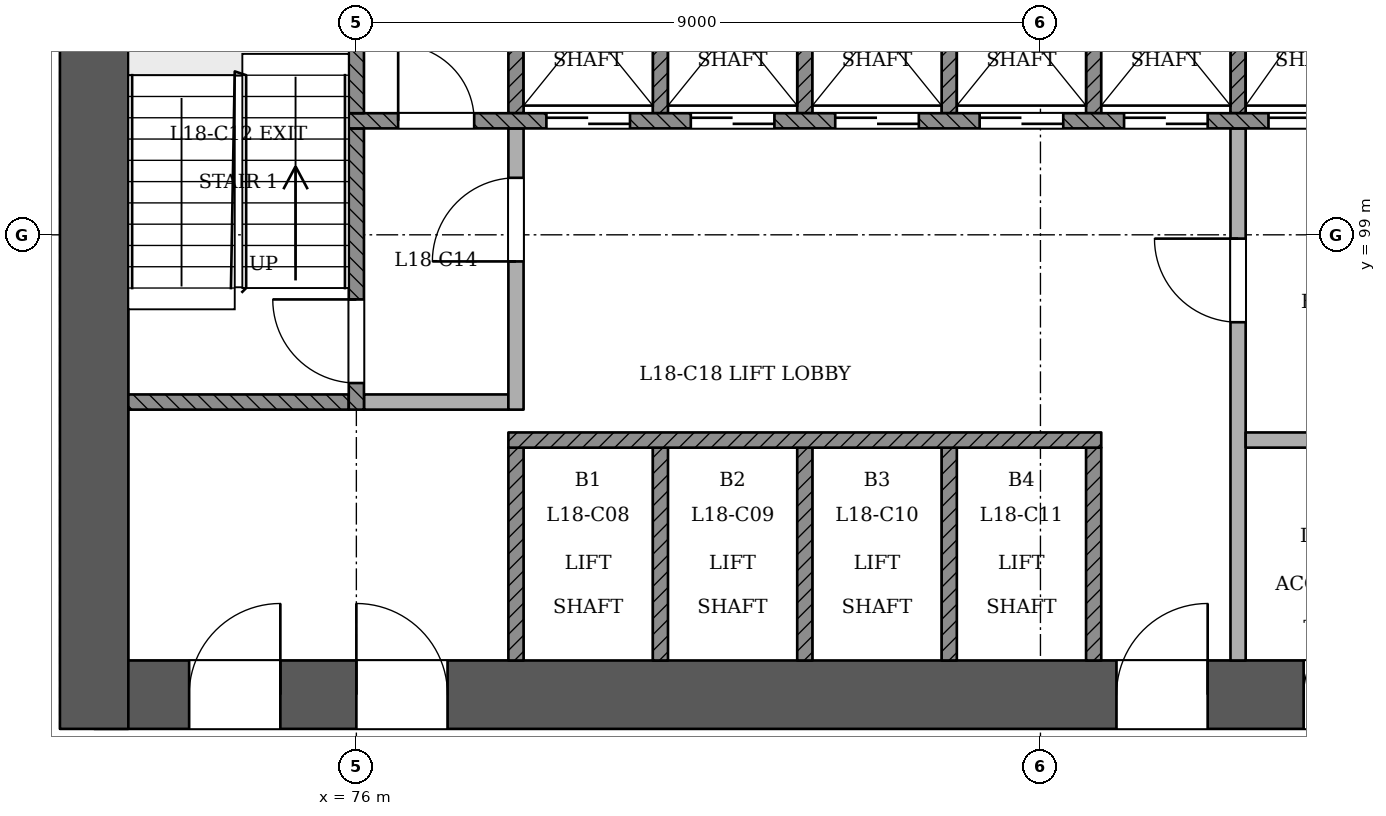
"""IFC4 building model, lengths in metres.
Left out: names, types, materials, properties, quantities, classifications, styles, units other than length and angle.
Written with IfcOpenShell. Run it as: python <this file> out.ifc"""

import sys

from ifc_helpers import new_model, si_unit, direction, frame, frame_2d, origin, place, context, subcontext, project, spatial, rectangle, extrude, element, fill, save


model = new_model("IFC4")
c1 = context("Model", 3, precision=1e-05, world=origin(), true_north=direction((0.0, 1.0)))
c2 = subcontext(c1, "Body", "Model", "MODEL_VIEW")
j1 = project(units=[si_unit("LENGTHUNIT", "METRE"), si_unit("PLANEANGLEUNIT", "RADIAN")], contexts=[c1])
p1 = place(None, origin())
s1 = spatial("IfcSite", under=j1, at=p1, CompositionType="ELEMENT")
p2 = place(p1, origin())
s2 = spatial("IfcBuilding", under=s1, at=p2, CompositionType="ELEMENT")
p3 = place(p2, frame((0.0, 0.0, 73.8)))
s3 = spatial("IfcBuildingStorey", under=s2, at=p3, CompositionType="ELEMENT", Elevation=73.8)
p4 = place(p3, frame((72.55, 92.95, 0.0), z_axis=(0.0, 0.0, 1.0), x_axis=(1.0, 0.0, 0.0)))
e1 = element("IfcWall", 1, at=p4, inside=s3, PredefinedType="SHEAR", context=c2, shape_type="SweptSolid", body=[
    extrude(rectangle(XDim=25.35, YDim=0.9, at=frame_2d((12.675, 0.0))), origin(), (0.0, 0.0, 1.0), 3.6),
])
p5 = place(p4, frame((1.25, 0.0, 0.0)))
e2 = element("IfcOpeningElement", 2, at=p5, cuts=e1, PredefinedType="OPENING", context=c2, shape_type="SweptSolid", body=[
    extrude(rectangle(XDim=1.2, YDim=2.1, at=frame_2d((0.6, 1.05))), frame((0.0, 0.46, 0.0), z_axis=(0.0, -1.0, 0.0), x_axis=(1.0, 0.0, 0.0)), (0.0, 0.0, 1.0), 0.921),
])
p6 = place(p4, frame((3.45, 0.0, 0.0)))
e3 = element("IfcOpeningElement", 3, at=p6, cuts=e1, PredefinedType="OPENING", context=c2, shape_type="SweptSolid", body=[
    extrude(rectangle(XDim=1.2, YDim=2.1, at=frame_2d((0.6, 1.05))), frame((0.0, 0.46, 0.0), z_axis=(0.0, -1.0, 0.0), x_axis=(1.0, 0.0, 0.0)), (0.0, 0.0, 1.0), 0.921),
])
p7 = place(p4, frame((13.45, 0.0, 0.0)))
e4 = element("IfcOpeningElement", 4, at=p7, cuts=e1, PredefinedType="OPENING", context=c2, shape_type="SweptSolid", body=[
    extrude(rectangle(XDim=1.2, YDim=2.1, at=frame_2d((0.6, 1.05))), frame((0.0, 0.46, 0.0), z_axis=(0.0, -1.0, 0.0), x_axis=(1.0, 0.0, 0.0)), (0.0, 0.0, 1.0), 0.921),
])
p8 = place(p4, frame((15.913, 0.0, 0.0)))
e5 = element("IfcOpeningElement", 5, at=p8, cuts=e1, PredefinedType="OPENING", context=c2, shape_type="SweptSolid", body=[
    extrude(rectangle(XDim=1.0, YDim=2.1, at=frame_2d((0.5, 1.05))), frame((0.0, 0.46, 0.0), z_axis=(0.0, -1.0, 0.0), x_axis=(1.0, 0.0, 0.0)), (0.0, 0.0, 1.0), 0.921),
])
p9 = place(p4, frame((18.35, 0.0, 0.0)))
e6 = element("IfcOpeningElement", 6, at=p9, cuts=e1, PredefinedType="OPENING", context=c2, shape_type="SweptSolid", body=[
    extrude(rectangle(XDim=1.0, YDim=2.1, at=frame_2d((0.5, 1.05))), frame((0.0, 0.46, 0.0), z_axis=(0.0, -1.0, 0.0), x_axis=(1.0, 0.0, 0.0)), (0.0, 0.0, 1.0), 0.921),
])
p10 = place(p4, frame((20.7, 0.0, 0.0)))
e7 = element("IfcOpeningElement", 7, at=p10, cuts=e1, PredefinedType="OPENING", context=c2, shape_type="SweptSolid", body=[
    extrude(rectangle(XDim=1.0, YDim=2.1, at=frame_2d((0.5, 1.05))), frame((0.0, 0.46, 0.0), z_axis=(0.0, -1.0, 0.0), x_axis=(1.0, 0.0, 0.0)), (0.0, 0.0, 1.0), 0.921),
])
p11 = place(p4, frame((22.988, 0.0, 0.0)))
e8 = element("IfcOpeningElement", 8, at=p11, cuts=e1, PredefinedType="OPENING", context=c2, shape_type="SweptSolid", body=[
    extrude(rectangle(XDim=1.0, YDim=2.1, at=frame_2d((0.5, 1.05))), frame((0.0, 0.46, 0.0), z_axis=(0.0, -1.0, 0.0), x_axis=(1.0, 0.0, 0.0)), (0.0, 0.0, 1.0), 0.921),
])
p12 = place(p3, frame((72.55, 103.85, 0.0), z_axis=(0.0, 0.0, 1.0), x_axis=(0.0, -1.0, 0.0)))
e9 = element("IfcWall", 9, at=p12, inside=s3, PredefinedType="SHEAR", context=c2, shape_type="SweptSolid", body=[
    extrude(rectangle(XDim=11.35, YDim=0.9, at=frame_2d((5.675, 0.0))), origin(), (0.0, 0.0, 1.0), 3.6),
])
p13 = place(p3, frame((85.747, 59.896, 0.0), z_axis=(0.0, 0.0, 1.0), x_axis=(0.500002549277, 0.866023931954, 0.0)))
e10 = element("IfcWall", 10, at=p13, inside=s3, PredefinedType="PARTITIONING", context=c2, shape_type="SweptSolid", body=[
    extrude(rectangle(XDim=43.082, YDim=0.15, at=frame_2d((21.541, 0.0))), origin(), (0.0, 0.0, 1.0), 2.7),
])
p14 = place(p13, frame((0.244, 0.0, 0.0)))
e11 = element("IfcOpeningElement", 11, at=p14, cuts=e10, PredefinedType="OPENING", context=c2, shape_type="SweptSolid", body=[
    extrude(rectangle(XDim=1.2, YDim=2.1, at=frame_2d((0.6, 1.05))), frame((0.0, 0.085, 0.0), z_axis=(0.0, -1.0, 0.0), x_axis=(1.0, 0.0, 0.0)), (0.0, 0.0, 1.0), 0.171),
])
p15 = place(p13, frame((4.146, 0.0, 0.0)))
e12 = element("IfcOpeningElement", 12, at=p15, cuts=e10, PredefinedType="OPENING", context=c2, shape_type="SweptSolid", body=[
    extrude(rectangle(XDim=1.0, YDim=2.1, at=frame_2d((0.5, 1.05))), frame((0.0, 0.085, 0.0), z_axis=(0.0, -1.0, 0.0), x_axis=(1.0, 0.0, 0.0)), (0.0, 0.0, 1.0), 0.171),
])
p16 = place(p13, frame((10.821, 0.0, 0.0)))
e13 = element("IfcOpeningElement", 13, at=p16, cuts=e10, PredefinedType="OPENING", context=c2, shape_type="SweptSolid", body=[
    extrude(rectangle(XDim=1.0, YDim=2.1, at=frame_2d((0.5, 1.05))), frame((0.0, 0.085, 0.0), z_axis=(0.0, -1.0, 0.0), x_axis=(1.0, 0.0, 0.0)), (0.0, 0.0, 1.0), 0.171),
])
p17 = place(p13, frame((13.262, 0.0, 0.0)))
e14 = element("IfcOpeningElement", 14, at=p17, cuts=e10, PredefinedType="OPENING", context=c2, shape_type="SweptSolid", body=[
    extrude(rectangle(XDim=1.0, YDim=2.1, at=frame_2d((0.5, 1.05))), frame((0.0, 0.085, 0.0), z_axis=(0.0, -1.0, 0.0), x_axis=(1.0, 0.0, 0.0)), (0.0, 0.0, 1.0), 0.171),
])
p18 = place(p13, frame((20.941, 0.0, 0.0)))
e15 = element("IfcOpeningElement", 15, at=p18, cuts=e10, PredefinedType="OPENING", context=c2, shape_type="SweptSolid", body=[
    extrude(rectangle(XDim=1.2, YDim=2.1, at=frame_2d((0.6, 1.05))), frame((0.0, 0.085, 0.0), z_axis=(0.0, -1.0, 0.0), x_axis=(1.0, 0.0, 0.0)), (0.0, 0.0, 1.0), 0.171),
])
p19 = place(p13, frame((28.821, 0.0, 0.0)))
e16 = element("IfcOpeningElement", 16, at=p19, cuts=e10, PredefinedType="OPENING", context=c2, shape_type="SweptSolid", body=[
    extrude(rectangle(XDim=1.0, YDim=2.1, at=frame_2d((0.5, 1.05))), frame((0.0, 0.085, 0.0), z_axis=(0.0, -1.0, 0.0), x_axis=(1.0, 0.0, 0.0)), (0.0, 0.0, 1.0), 0.171),
])
p20 = place(p13, frame((31.112, 0.0, 0.0)))
e17 = element("IfcOpeningElement", 17, at=p20, cuts=e10, PredefinedType="OPENING", context=c2, shape_type="SweptSolid", body=[
    extrude(rectangle(XDim=1.1, YDim=2.1, at=frame_2d((0.55, 1.05))), frame((0.0, 0.085, 0.0), z_axis=(0.0, -1.0, 0.0), x_axis=(1.0, 0.0, 0.0)), (0.0, 0.0, 1.0), 0.171),
])
p21 = place(p13, frame((38.514, 0.0, 0.0)))
e18 = element("IfcOpeningElement", 18, at=p21, cuts=e10, PredefinedType="OPENING", context=c2, shape_type="SweptSolid", body=[
    extrude(rectangle(XDim=1.2, YDim=2.1, at=frame_2d((0.6, 1.05))), frame((0.0, 0.085, 0.0), z_axis=(0.0, -1.0, 0.0), x_axis=(1.0, 0.0, 0.0)), (0.0, 0.0, 1.0), 0.171),
])
for number, where, z_axis, x_axis in (
    (19, (78.1, 93.4, 0.0), (0.0, 0.0, 1.0), (0.0, 1.0, 0.0)),
    (20, (80.0, 93.4, 0.0), (0.0, 0.0, 1.0), (0.0, 1.0, 0.0)),
    (21, (81.9, 93.4, 0.0), (0.0, 0.0, 1.0), (0.0, 1.0, 0.0)),
    (22, (83.8, 93.4, 0.0), (0.0, 0.0, 1.0), (0.0, 1.0, 0.0)),
    (23, (85.7, 93.4, 0.0), (0.0, 0.0, 1.0), (0.0, 1.0, 0.0)),
):
    element("IfcWall", number, at=place(p3, frame(where, z_axis=z_axis, x_axis=x_axis)), inside=s3, PredefinedType="SOLIDWALL", context=c2, shape_type="SweptSolid", body=[
        extrude(rectangle(XDim=2.8, YDim=0.2, at=frame_2d((1.4, 0.0))), origin(), (0.0, 0.0, 1.0), 3.1),
    ])
p22 = place(p3, frame((87.6, 93.4, 0.0), z_axis=(0.0, 0.0, 1.0), x_axis=(0.0, 1.0, 0.0)))
e24 = element("IfcWall", 24, at=p22, inside=s3, PredefinedType="PARTITIONING", context=c2, shape_type="SweptSolid", body=[
    extrude(rectangle(XDim=7.0, YDim=0.2, at=frame_2d((3.5, 0.0))), origin(), (0.0, 0.0, 1.0), 3.1),
])
p23 = place(p22, frame((4.45, 0.0, 0.0)))
e25 = element("IfcOpeningElement", 25, at=p23, cuts=e24, PredefinedType="OPENING", context=c2, shape_type="SweptSolid", body=[
    extrude(rectangle(XDim=1.1, YDim=2.1, at=frame_2d((0.55, 1.05))), frame((0.0, 0.11, 0.0), z_axis=(0.0, -1.0, 0.0), x_axis=(1.0, 0.0, 0.0)), (0.0, 0.0, 1.0), 0.221),
])
p24 = place(p3, frame((78.0, 96.3, 0.0), z_axis=(0.0, 0.0, 1.0), x_axis=(1.0, 0.0, 0.0)))
e26 = element("IfcWall", 26, at=p24, inside=s3, PredefinedType="SOLIDWALL", context=c2, shape_type="SweptSolid", body=[
    extrude(rectangle(XDim=7.8, YDim=0.2, at=frame_2d((3.9, 0.0))), origin(), (0.0, 0.0, 1.0), 3.1),
])
p25 = place(p3, frame((87.7, 96.3, 0.0), z_axis=(0.0, 0.0, 1.0), x_axis=(1.0, 0.0, 0.0)))
e27 = element("IfcWall", 27, at=p25, inside=s3, PredefinedType="PARTITIONING", context=c2, shape_type="SweptSolid", body=[
    extrude(rectangle(XDim=3.6, YDim=0.2, at=frame_2d((1.8, 0.0))), origin(), (0.0, 0.0, 1.0), 3.1),
])
p26 = place(p3, frame((73.0, 96.8, 0.0), z_axis=(0.0, 0.0, 1.0), x_axis=(1.0, 0.0, 0.0)))
e28 = element("IfcWall", 28, at=p26, inside=s3, PredefinedType="SOLIDWALL", context=c2, shape_type="SweptSolid", body=[
    extrude(rectangle(XDim=2.9, YDim=0.2, at=frame_2d((1.45, 0.0))), origin(), (0.0, 0.0, 1.0), 3.1),
])
p27 = place(p3, frame((76.0, 96.7, 0.0), z_axis=(0.0, 0.0, 1.0), x_axis=(0.0, 1.0, 0.0)))
e29 = element("IfcWall", 29, at=p27, inside=s3, PredefinedType="SOLIDWALL", context=c2, shape_type="SweptSolid", body=[
    extrude(rectangle(XDim=3.7, YDim=0.2, at=frame_2d((1.85, 0.0))), origin(), (0.0, 0.0, 1.0), 3.1),
])
p28 = place(p27, frame((0.35, 0.0, 0.0)))
e30 = element("IfcOpeningElement", 30, at=p28, cuts=e29, PredefinedType="OPENING", context=c2, shape_type="SweptSolid", body=[
    extrude(rectangle(XDim=1.1, YDim=2.1, at=frame_2d((0.55, 1.05))), frame((0.0, 0.11, 0.0), z_axis=(0.0, -1.0, 0.0), x_axis=(1.0, 0.0, 0.0)), (0.0, 0.0, 1.0), 0.221),
])
p29 = place(p3, frame((76.1, 96.8, 0.0), z_axis=(0.0, 0.0, 1.0), x_axis=(1.0, 0.0, 0.0)))
e31 = element("IfcWall", 31, at=p29, inside=s3, PredefinedType="PARTITIONING", context=c2, shape_type="SweptSolid", body=[
    extrude(rectangle(XDim=1.9, YDim=0.2, at=frame_2d((0.95, 0.0))), origin(), (0.0, 0.0, 1.0), 3.1),
])
p30 = place(p3, frame((78.1, 96.7, 0.0), z_axis=(0.0, 0.0, 1.0), x_axis=(0.0, 1.0, 0.0)))
e32 = element("IfcWall", 32, at=p30, inside=s3, PredefinedType="PARTITIONING", context=c2, shape_type="SweptSolid", body=[
    extrude(rectangle(XDim=3.7, YDim=0.2, at=frame_2d((1.85, 0.0))), origin(), (0.0, 0.0, 1.0), 3.1),
])
p31 = place(p30, frame((1.95, 0.0, 0.0)))
e33 = element("IfcOpeningElement", 33, at=p31, cuts=e32, PredefinedType="OPENING", context=c2, shape_type="SweptSolid", body=[
    extrude(rectangle(XDim=1.1, YDim=2.1, at=frame_2d((0.55, 1.05))), frame((0.0, 0.11, 0.0), z_axis=(0.0, -1.0, 0.0), x_axis=(1.0, 0.0, 0.0)), (0.0, 0.0, 1.0), 0.221),
])
p32 = place(p3, frame((75.9, 100.5, 0.0), z_axis=(0.0, 0.0, 1.0), x_axis=(1.0, 0.0, 0.0)))
e34 = element("IfcWall", 34, at=p32, inside=s3, PredefinedType="SOLIDWALL", context=c2, shape_type="SweptSolid", body=[
    extrude(rectangle(XDim=18.2, YDim=0.2, at=frame_2d((9.1, 0.0))), origin(), (0.0, 0.0, 1.0), 3.1),
])
p33 = place(p32, frame((2.6, 0.0, 0.0)))
e35 = element("IfcOpeningElement", 35, at=p33, cuts=e34, PredefinedType="OPENING", context=c2, shape_type="SweptSolid", body=[
    extrude(rectangle(XDim=1.1, YDim=2.1, at=frame_2d((0.55, 1.05))), frame((0.0, 0.11, 0.0), z_axis=(0.0, -1.0, 0.0), x_axis=(1.0, 0.0, 0.0)), (0.0, 0.0, 1.0), 0.221),
])
p34 = place(p32, frame((4.5, 0.0, 0.0)))
e36 = element("IfcOpeningElement", 36, at=p34, cuts=e34, PredefinedType="OPENING", context=c2, shape_type="SweptSolid", body=[
    extrude(rectangle(XDim=1.1, YDim=2.1, at=frame_2d((0.55, 1.05))), frame((0.0, 0.11, 0.0), z_axis=(0.0, -1.0, 0.0), x_axis=(1.0, 0.0, 0.0)), (0.0, 0.0, 1.0), 0.221),
])
p35 = place(p32, frame((6.4, 0.0, 0.0)))
e37 = element("IfcOpeningElement", 37, at=p35, cuts=e34, PredefinedType="OPENING", context=c2, shape_type="SweptSolid", body=[
    extrude(rectangle(XDim=1.1, YDim=2.1, at=frame_2d((0.55, 1.05))), frame((0.0, 0.11, 0.0), z_axis=(0.0, -1.0, 0.0), x_axis=(1.0, 0.0, 0.0)), (0.0, 0.0, 1.0), 0.221),
])
p36 = place(p32, frame((8.3, 0.0, 0.0)))
e38 = element("IfcOpeningElement", 38, at=p36, cuts=e34, PredefinedType="OPENING", context=c2, shape_type="SweptSolid", body=[
    extrude(rectangle(XDim=1.1, YDim=2.1, at=frame_2d((0.55, 1.05))), frame((0.0, 0.11, 0.0), z_axis=(0.0, -1.0, 0.0), x_axis=(1.0, 0.0, 0.0)), (0.0, 0.0, 1.0), 0.221),
])
p37 = place(p32, frame((10.2, 0.0, 0.0)))
e39 = element("IfcOpeningElement", 39, at=p37, cuts=e34, PredefinedType="OPENING", context=c2, shape_type="SweptSolid", body=[
    extrude(rectangle(XDim=1.1, YDim=2.1, at=frame_2d((0.55, 1.05))), frame((0.0, 0.11, 0.0), z_axis=(0.0, -1.0, 0.0), x_axis=(1.0, 0.0, 0.0)), (0.0, 0.0, 1.0), 0.221),
])
p38 = place(p32, frame((12.1, 0.0, 0.0)))
e40 = element("IfcOpeningElement", 40, at=p38, cuts=e34, PredefinedType="OPENING", context=c2, shape_type="SweptSolid", body=[
    extrude(rectangle(XDim=1.1, YDim=2.1, at=frame_2d((0.55, 1.05))), frame((0.0, 0.11, 0.0), z_axis=(0.0, -1.0, 0.0), x_axis=(1.0, 0.0, 0.0)), (0.0, 0.0, 1.0), 0.221),
])
p39 = place(p32, frame((14.0, 0.0, 0.0)))
e41 = element("IfcOpeningElement", 41, at=p39, cuts=e34, PredefinedType="OPENING", context=c2, shape_type="SweptSolid", body=[
    extrude(rectangle(XDim=1.1, YDim=2.1, at=frame_2d((0.55, 1.05))), frame((0.0, 0.11, 0.0), z_axis=(0.0, -1.0, 0.0), x_axis=(1.0, 0.0, 0.0)), (0.0, 0.0, 1.0), 0.221),
])
p40 = place(p32, frame((0.65, 0.0, 0.0)))
e42 = element("IfcOpeningElement", 42, at=p40, cuts=e34, PredefinedType="OPENING", context=c2, shape_type="SweptSolid", body=[
    extrude(rectangle(XDim=1.0, YDim=2.1, at=frame_2d((0.5, 1.05))), frame((0.0, 0.11, 0.0), z_axis=(0.0, -1.0, 0.0), x_axis=(1.0, 0.0, 0.0)), (0.0, 0.0, 1.0), 0.221),
])
p41 = place(p32, frame((16.3, 0.0, 0.0)))
e43 = element("IfcOpeningElement", 43, at=p41, cuts=e34, PredefinedType="OPENING", context=c2, shape_type="SweptSolid", body=[
    extrude(rectangle(XDim=1.0, YDim=2.1, at=frame_2d((0.5, 1.05))), frame((0.0, 0.11, 0.0), z_axis=(0.0, -1.0, 0.0), x_axis=(1.0, 0.0, 0.0)), (0.0, 0.0, 1.0), 0.221),
])
for number, where, z_axis, x_axis in (
    (44, (76.0, 100.6, 0.0), (0.0, 0.0, 1.0), (0.0, 1.0, 0.0)),
    (45, (78.1, 100.6, 0.0), (0.0, 0.0, 1.0), (0.0, 1.0, 0.0)),
    (46, (80.0, 100.6, 0.0), (0.0, 0.0, 1.0), (0.0, 1.0, 0.0)),
    (47, (81.9, 100.6, 0.0), (0.0, 0.0, 1.0), (0.0, 1.0, 0.0)),
    (48, (83.8, 100.6, 0.0), (0.0, 0.0, 1.0), (0.0, 1.0, 0.0)),
    (49, (85.7, 100.6, 0.0), (0.0, 0.0, 1.0), (0.0, 1.0, 0.0)),
    (50, (87.6, 100.6, 0.0), (0.0, 0.0, 1.0), (0.0, 1.0, 0.0)),
):
    element("IfcWall", number, at=place(p3, frame(where, z_axis=z_axis, x_axis=x_axis)), inside=s3, PredefinedType="SOLIDWALL", context=c2, shape_type="SweptSolid", body=[
        extrude(rectangle(XDim=2.8, YDim=0.2, at=frame_2d((1.4, 0.0))), origin(), (0.0, 0.0, 1.0), 3.1),
    ])
p42 = place(p33, origin())
e51 = element("IfcDoor", 51, at=p42, inside=s3, OperationType="SLIDING_TO_RIGHT", PredefinedType="NOTDEFINED", context=c2, shape_type="SweptSolid", body=[
    extrude(rectangle(XDim=1.1, YDim=2.1, at=frame_2d((0.55, 1.05))), frame((0.0, 0.025, 0.0), z_axis=(0.0, -1.0, 0.0), x_axis=(1.0, 0.0, 0.0)), (0.0, 0.0, 1.0), 0.05),
])
fill(e35, e51)
p43 = place(p34, origin())
e52 = element("IfcDoor", 52, at=p43, inside=s3, OperationType="SLIDING_TO_LEFT", PredefinedType="NOTDEFINED", context=c2, shape_type="SweptSolid", body=[
    extrude(rectangle(XDim=1.1, YDim=2.1, at=frame_2d((0.55, 1.05))), frame((0.0, 0.025, 0.0), z_axis=(0.0, -1.0, 0.0), x_axis=(1.0, 0.0, 0.0)), (0.0, 0.0, 1.0), 0.05),
])
fill(e36, e52)
p44 = place(p35, origin())
e53 = element("IfcDoor", 53, at=p44, inside=s3, OperationType="SLIDING_TO_RIGHT", PredefinedType="NOTDEFINED", context=c2, shape_type="SweptSolid", body=[
    extrude(rectangle(XDim=1.1, YDim=2.1, at=frame_2d((0.55, 1.05))), frame((0.0, 0.025, 0.0), z_axis=(0.0, -1.0, 0.0), x_axis=(1.0, 0.0, 0.0)), (0.0, 0.0, 1.0), 0.05),
])
fill(e37, e53)
p45 = place(p36, origin())
e54 = element("IfcDoor", 54, at=p45, inside=s3, OperationType="SLIDING_TO_LEFT", PredefinedType="NOTDEFINED", context=c2, shape_type="SweptSolid", body=[
    extrude(rectangle(XDim=1.1, YDim=2.1, at=frame_2d((0.55, 1.05))), frame((0.0, 0.025, 0.0), z_axis=(0.0, -1.0, 0.0), x_axis=(1.0, 0.0, 0.0)), (0.0, 0.0, 1.0), 0.05),
])
fill(e38, e54)
p46 = place(p37, origin())
e55 = element("IfcDoor", 55, at=p46, inside=s3, OperationType="SLIDING_TO_RIGHT", PredefinedType="NOTDEFINED", context=c2, shape_type="SweptSolid", body=[
    extrude(rectangle(XDim=1.1, YDim=2.1, at=frame_2d((0.55, 1.05))), frame((0.0, 0.025, 0.0), z_axis=(0.0, -1.0, 0.0), x_axis=(1.0, 0.0, 0.0)), (0.0, 0.0, 1.0), 0.05),
])
fill(e39, e55)
p47 = place(p38, origin())
e56 = element("IfcDoor", 56, at=p47, inside=s3, OperationType="SLIDING_TO_RIGHT", PredefinedType="NOTDEFINED", context=c2, shape_type="SweptSolid", body=[
    extrude(rectangle(XDim=1.1, YDim=2.1, at=frame_2d((0.55, 1.05))), frame((0.0, 0.025, 0.0), z_axis=(0.0, -1.0, 0.0), x_axis=(1.0, 0.0, 0.0)), (0.0, 0.0, 1.0), 0.05),
])
fill(e40, e56)
p48 = place(p28, origin())
e57 = element("IfcDoor", 57, at=p48, inside=s3, OperationType="SINGLE_SWING_RIGHT", PredefinedType="NOTDEFINED", context=c2, shape_type="SweptSolid", body=[
    extrude(rectangle(XDim=1.1, YDim=2.1, at=frame_2d((0.55, 1.05))), frame((0.0, 0.025, 0.0), z_axis=(0.0, -1.0, 0.0), x_axis=(1.0, 0.0, 0.0)), (0.0, 0.0, 1.0), 0.05),
])
fill(e30, e57)
p49 = place(p31, origin())
e58 = element("IfcDoor", 58, at=p49, inside=s3, OperationType="SINGLE_SWING_LEFT", PredefinedType="NOTDEFINED", context=c2, shape_type="SweptSolid", body=[
    extrude(rectangle(XDim=1.1, YDim=2.1, at=frame_2d((0.55, 1.05))), frame((0.0, 0.025, 0.0), z_axis=(0.0, -1.0, 0.0), x_axis=(1.0, 0.0, 0.0)), (0.0, 0.0, 1.0), 0.05),
])
fill(e33, e58)
p50 = place(p23, origin())
e59 = element("IfcDoor", 59, at=p50, inside=s3, OperationType="SINGLE_SWING_RIGHT", PredefinedType="NOTDEFINED", context=c2, shape_type="SweptSolid", body=[
    extrude(rectangle(XDim=1.1, YDim=2.1, at=frame_2d((0.55, 1.05))), frame((0.0, 0.025, 0.0), z_axis=(0.0, -1.0, 0.0), x_axis=(1.0, 0.0, 0.0)), (0.0, 0.0, 1.0), 0.05),
])
fill(e25, e59)
p51 = place(p5, origin())
e60 = element("IfcDoor", 60, at=p51, inside=s3, OperationType="SINGLE_SWING_RIGHT", PredefinedType="NOTDEFINED", context=c2, shape_type="SweptSolid", body=[
    extrude(rectangle(XDim=1.2, YDim=2.1, at=frame_2d((0.6, 1.05))), frame((0.0, 0.025, 0.0), z_axis=(0.0, -1.0, 0.0), x_axis=(1.0, 0.0, 0.0)), (0.0, 0.0, 1.0), 0.05),
])
fill(e2, e60)
p52 = place(p6, origin())
e61 = element("IfcDoor", 61, at=p52, inside=s3, OperationType="SINGLE_SWING_LEFT", PredefinedType="NOTDEFINED", context=c2, shape_type="SweptSolid", body=[
    extrude(rectangle(XDim=1.2, YDim=2.1, at=frame_2d((0.6, 1.05))), frame((0.0, 0.025, 0.0), z_axis=(0.0, -1.0, 0.0), x_axis=(1.0, 0.0, 0.0)), (0.0, 0.0, 1.0), 0.05),
])
fill(e3, e61)
p53 = place(p7, origin())
e62 = element("IfcDoor", 62, at=p53, inside=s3, OperationType="SINGLE_SWING_RIGHT", PredefinedType="NOTDEFINED", context=c2, shape_type="SweptSolid", body=[
    extrude(rectangle(XDim=1.2, YDim=2.1, at=frame_2d((0.6, 1.05))), frame((0.0, 0.025, 0.0), z_axis=(0.0, -1.0, 0.0), x_axis=(1.0, 0.0, 0.0)), (0.0, 0.0, 1.0), 0.05),
])
fill(e4, e62)
p54 = place(p40, origin())
e63 = element("IfcDoor", 63, at=p54, inside=s3, OperationType="SINGLE_SWING_LEFT", PredefinedType="NOTDEFINED", context=c2, shape_type="SweptSolid", body=[
    extrude(rectangle(XDim=1.0, YDim=2.1, at=frame_2d((0.5, 1.05))), frame((0.0, 0.025, 0.0), z_axis=(0.0, -1.0, 0.0), x_axis=(1.0, 0.0, 0.0)), (0.0, 0.0, 1.0), 0.05),
])
fill(e42, e63)
p55 = place(p8, origin())
e64 = element("IfcDoor", 64, at=p55, inside=s3, OperationType="SINGLE_SWING_RIGHT", PredefinedType="NOTDEFINED", context=c2, shape_type="SweptSolid", body=[
    extrude(rectangle(XDim=1.0, YDim=2.1, at=frame_2d((0.5, 1.05))), frame((0.0, 0.025, 0.0), z_axis=(0.0, -1.0, 0.0), x_axis=(1.0, 0.0, 0.0)), (0.0, 0.0, 1.0), 0.05),
])
fill(e5, e64)
save(model, sys.argv[1])
